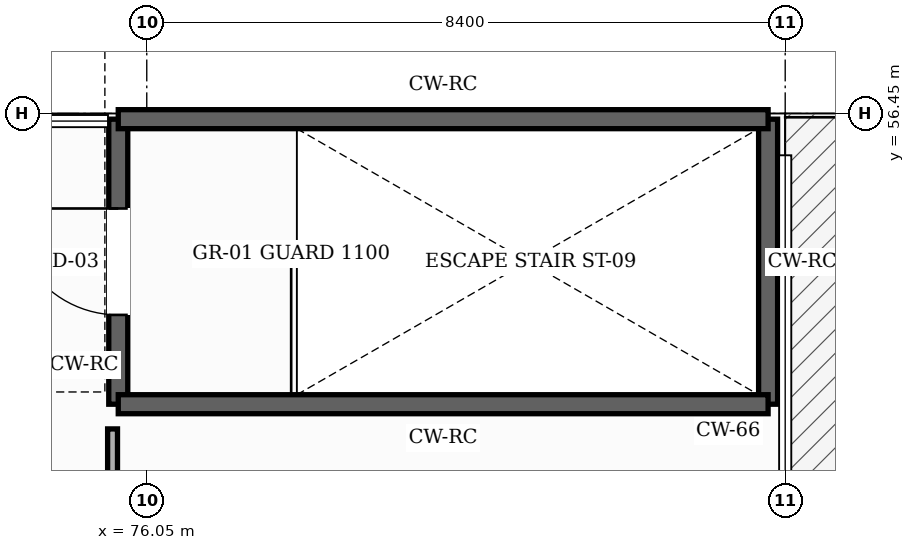
"""IFC4 building model, lengths in metres.
Left out: names, types, materials, properties, quantities, classifications, styles, units other than length and angle.
Written with IfcOpenShell. Run it as: python <this file> out.ifc"""

import sys

from ifc_helpers import new_model, si_unit, direction, frame, frame_2d, origin, place, context, subcontext, project, spatial, rectangle, extrude, element, fill, save


model = new_model("IFC4")
c1 = context("Model", 3, precision=1e-05, world=origin(), true_north=direction((0.0, 1.0)))
c2 = subcontext(c1, "Body", "Model", "MODEL_VIEW")
j1 = project(units=[si_unit("LENGTHUNIT", "METRE"), si_unit("PLANEANGLEUNIT", "RADIAN")], contexts=[c1])
p1 = place(None, origin())
s1 = spatial("IfcSite", under=j1, at=p1, CompositionType="ELEMENT")
p2 = place(p1, origin())
s2 = spatial("IfcBuilding", under=s1, at=p2, CompositionType="ELEMENT")
p3 = place(p2, frame((0.0, 0.0, 19.8)))
s3 = spatial("IfcBuildingStorey", under=s2, at=p3, CompositionType="ELEMENT", Elevation=19.8)
p4 = place(p3, frame((75.675, 52.625, 0.0), z_axis=(0.0, 0.0, 1.0), x_axis=(0.0, 1.0, 0.0)))
e1 = element("IfcWall", 1, at=p4, inside=s3, PredefinedType="SHEAR", context=c2, shape_type="SweptSolid", body=[
    extrude(rectangle(XDim=3.75, YDim=0.25, at=frame_2d((1.875, 0.0))), origin(), (0.0, 0.0, 1.0), 4.58),
])
p5 = place(p4, frame((1.175, 0.0, 0.0)))
e2 = element("IfcOpeningElement", 2, at=p5, cuts=e1, PredefinedType="OPENING", context=c2, shape_type="SweptSolid", body=[
    extrude(rectangle(XDim=1.4, YDim=2.25, at=frame_2d((0.7, 1.125))), frame((0.0, 0.135, 0.0), z_axis=(0.0, -1.0, 0.0), x_axis=(1.0, 0.0, 0.0)), (0.0, 0.0, 1.0), 0.27),
])
p6 = place(p3, frame((84.225, 56.375, 0.0), z_axis=(0.0, 0.0, 1.0), x_axis=(0.0, -1.0, 0.0)))
e3 = element("IfcWall", 3, at=p6, inside=s3, PredefinedType="SHEAR", context=c2, shape_type="SweptSolid", body=[
    extrude(rectangle(XDim=3.75, YDim=0.25, at=frame_2d((1.875, 0.0))), origin(), (0.0, 0.0, 1.0), 4.58),
])
for number, where, z_axis, x_axis in (
    (4, (84.225, 52.625, 0.0), (0.0, 0.0, 1.0), (-1.0, 0.0, 0.0)),
    (5, (75.675, 56.375, 0.0), (0.0, 0.0, 1.0), (1.0, 0.0, 0.0)),
):
    element("IfcWall", number, at=place(p3, frame(where, z_axis=z_axis, x_axis=x_axis)), inside=s3, PredefinedType="SHEAR", context=c2, shape_type="SweptSolid", body=[
        extrude(rectangle(XDim=8.55, YDim=0.25, at=frame_2d((4.275, 0.0))), origin(), (0.0, 0.0, 1.0), 4.58),
    ])
p7 = place(p3, frame((75.6, 16.6, 0.0), z_axis=(0.0, 0.0, 1.0), x_axis=(0.0, 1.0, 0.0)))
e6 = element("IfcWall", 6, at=p7, inside=s3, PredefinedType="PARTITIONING", context=c2, shape_type="SweptSolid", body=[
    extrude(rectangle(XDim=35.7, YDim=0.13, at=frame_2d((17.85, 0.0))), origin(), (0.0, 0.0, 1.0), 4.565),
])
p8 = place(p7, frame((17.1, 0.0, 0.0)))
e7 = element("IfcOpeningElement", 7, at=p8, cuts=e6, PredefinedType="OPENING", context=c2, shape_type="SweptSolid", body=[
    extrude(rectangle(XDim=1.5, YDim=2.3, at=frame_2d((0.75, 1.15))), frame((0.0, 0.075, 0.0), z_axis=(0.0, -1.0, 0.0), x_axis=(1.0, 0.0, 0.0)), (0.0, 0.0, 1.0), 0.15),
])
p9 = place(p5, origin())
e8 = element("IfcDoor", 8, at=p9, inside=s3, OperationType="SINGLE_SWING_RIGHT", PredefinedType="DOOR", context=c2, shape_type="SweptSolid", body=[
    extrude(rectangle(XDim=1.4, YDim=2.25, at=frame_2d((0.7, 1.125))), frame((0.0, 0.025, 0.0), z_axis=(0.0, -1.0, 0.0), x_axis=(1.0, 0.0, 0.0)), (0.0, 0.0, 1.0), 0.05),
])
fill(e2, e8)
save(model, sys.argv[1])
